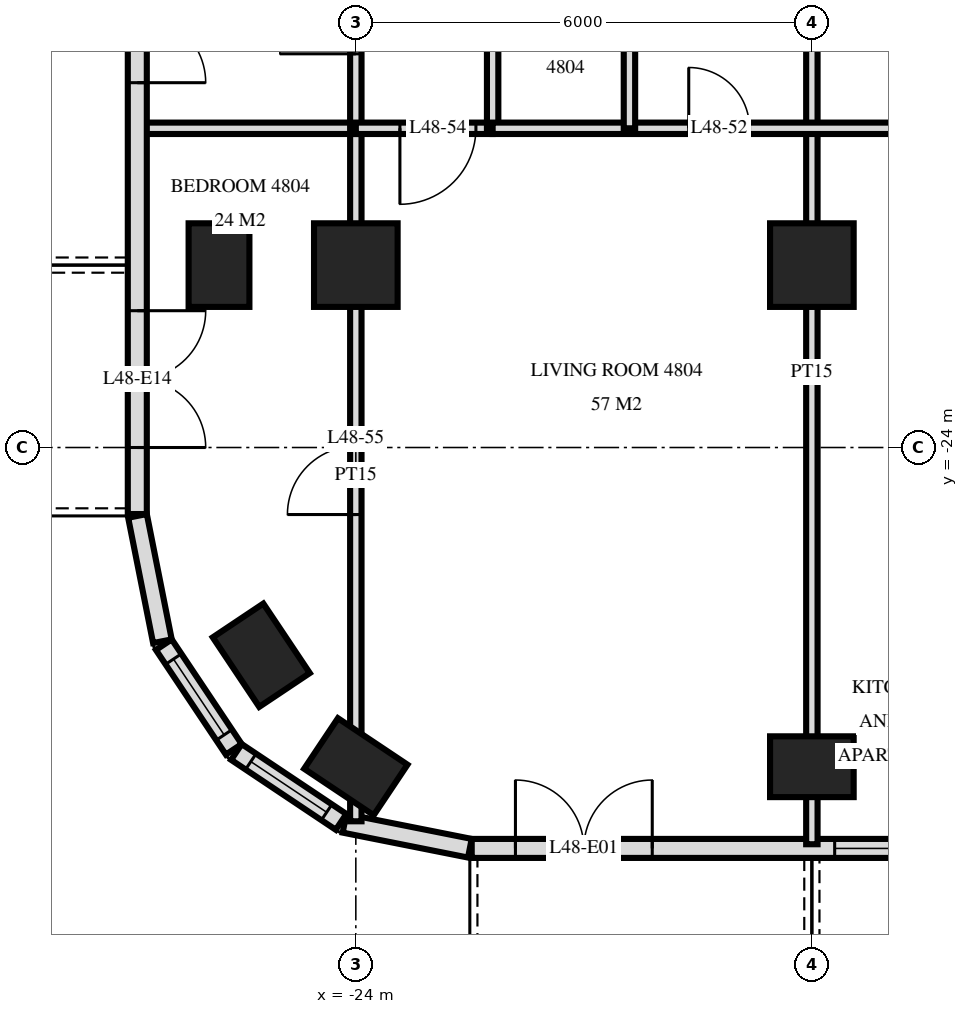
"""IFC4 building model, lengths in metres.
Left out: names, types, materials, properties, quantities, classifications, styles, units other than length and angle.
Written with IfcOpenShell. Run it as: python <this file> out.ifc"""

import sys

from ifc_helpers import new_model, si_unit, direction, frame, frame_2d, origin, origin_2d, place, context, subcontext, project, spatial, rectangle, extrude, element, fill, save


model = new_model("IFC4")
c1 = context("Model", 3, precision=1e-05, world=origin(), true_north=direction((0.0, 1.0)))
c2 = subcontext(c1, "Body", "Model", "MODEL_VIEW")
j1 = project(units=[si_unit("LENGTHUNIT", "METRE"), si_unit("PLANEANGLEUNIT", "RADIAN")], contexts=[c1])
p1 = place(None, origin())
s1 = spatial("IfcSite", under=j1, at=p1, CompositionType="ELEMENT")
p2 = place(p1, origin())
s2 = spatial("IfcBuilding", under=s1, at=p2, CompositionType="ELEMENT")
p3 = place(p2, frame((0.0, 0.0, 187.1)))
s3 = spatial("IfcBuildingStorey", under=s2, at=p3, CompositionType="ELEMENT", Elevation=187.1)
for number, where, z_axis, x_axis in (
    (1, (-25.8, -21.6, 0.0), (0.0, 0.0, 1.0), (0.0, 1.0, 0.0)),
    (2, (-25.244, -26.733, 0.0), (0.0, 0.0, 1.0), (-0.556, 0.831, 0.0)),
    (3, (-24.0, -28.2, 0.0), (0.0, 0.0, 1.0), (-0.831, 0.556, 0.0)),
):
    element("IfcColumn", number, at=place(p3, frame(where, z_axis=z_axis, x_axis=x_axis)), inside=s3, PredefinedType="COLUMN", context=c2, shape_type="SweptSolid", body=[
        extrude(rectangle(XDim=1.1, YDim=0.8, at=origin_2d()), origin(), (0.0, 0.0, 1.0), 3.5),
    ])
p4 = place(p3, frame((-24.0, -21.6, 0.0), z_axis=(0.0, 0.0, 1.0), x_axis=(1.0, 0.0, 0.0)))
e4 = element("IfcColumn", 4, at=p4, inside=s3, PredefinedType="COLUMN", context=c2, shape_type="SweptSolid", body=[
    extrude(rectangle(XDim=1.1, YDim=1.1, at=origin_2d()), origin(), (0.0, 0.0, 1.0), 3.5),
])
p5 = place(p3, frame((-18.0, -28.2, 0.0), z_axis=(0.0, 0.0, 1.0), x_axis=(1.0, 0.0, 0.0)))
e5 = element("IfcColumn", 5, at=p5, inside=s3, PredefinedType="COLUMN", context=c2, shape_type="SweptSolid", body=[
    extrude(rectangle(XDim=1.1, YDim=0.8, at=origin_2d()), origin(), (0.0, 0.0, 1.0), 3.5),
])
p6 = place(p3, frame((-18.0, -21.6, 0.0), z_axis=(0.0, 0.0, 1.0), x_axis=(1.0, 0.0, 0.0)))
e6 = element("IfcColumn", 6, at=p6, inside=s3, PredefinedType="COLUMN", context=c2, shape_type="SweptSolid", body=[
    extrude(rectangle(XDim=1.1, YDim=1.1, at=origin_2d()), origin(), (0.0, 0.0, 1.0), 3.5),
])
p7 = place(p3, frame((-26.875, -3.325, 0.0), z_axis=(0.0, 0.0, 1.0), x_axis=(0.0, -1.0, 0.0)))
e7 = element("IfcWall", 7, at=p7, inside=s3, PredefinedType="SOLIDWALL", context=c2, shape_type="SweptSolid", body=[
    extrude(rectangle(XDim=21.551, YDim=0.25, at=frame_2d((10.775, 0.0))), origin(), (0.0, 0.0, 1.0), 3.22),
])
p8 = place(p7, frame((7.025, 0.0, 0.0)))
e8 = element("IfcOpeningElement", 8, at=p8, cuts=e7, PredefinedType="OPENING", context=c2, shape_type="SweptSolid", body=[
    extrude(rectangle(XDim=1.8, YDim=2.4, at=frame_2d((0.9, 1.2))), frame((0.0, 0.135, 0.0), z_axis=(0.0, -1.0, 0.0), x_axis=(1.0, 0.0, 0.0)), (0.0, 0.0, 1.0), 0.27),
])
p9 = place(p7, frame((14.075, 0.0, 0.0)))
e9 = element("IfcOpeningElement", 9, at=p9, cuts=e7, PredefinedType="OPENING", context=c2, shape_type="SweptSolid", body=[
    extrude(rectangle(XDim=1.8, YDim=2.4, at=frame_2d((0.9, 1.2))), frame((0.0, 0.135, 0.0), z_axis=(0.0, -1.0, 0.0), x_axis=(1.0, 0.0, 0.0)), (0.0, 0.0, 1.0), 0.27),
])
p10 = place(p7, frame((18.875, 0.0, 0.0)))
e10 = element("IfcOpeningElement", 10, at=p10, cuts=e7, PredefinedType="OPENING", context=c2, shape_type="SweptSolid", body=[
    extrude(rectangle(XDim=1.8, YDim=2.4, at=frame_2d((0.9, 1.2))), frame((0.0, 0.135, 0.0), z_axis=(0.0, -1.0, 0.0), x_axis=(1.0, 0.0, 0.0)), (0.0, 0.0, 1.0), 0.27),
])
p11 = place(p3, frame((-26.873, -24.9, 0.0), z_axis=(0.0, 0.0, 1.0), x_axis=(0.195026884138, -0.980797896849, 0.0)))
e11 = element("IfcWall", 11, at=p11, inside=s3, PredefinedType="SOLIDWALL", context=c2, shape_type="SweptSolid", body=[
    extrude(rectangle(XDim=1.681, YDim=0.25, at=frame_2d((0.841, 0.0))), origin(), (0.0, 0.0, 1.0), 3.22),
])
p12 = place(p3, frame((-26.526, -26.594, 0.0), z_axis=(0.0, 0.0, 1.0), x_axis=(0.55555029066, -0.831482937015, 0.0)))
e12 = element("IfcWall", 12, at=p12, inside=s3, PredefinedType="SOLIDWALL", context=c2, shape_type="SweptSolid", body=[
    extrude(rectangle(XDim=1.656, YDim=0.25, at=frame_2d((0.828, 0.0))), origin(), (0.0, 0.0, 1.0), 3.22),
])
p13 = place(p12, frame((0.228, 0.0, 0.9)))
e13 = element("IfcOpeningElement", 13, at=p13, cuts=e12, PredefinedType="OPENING", context=c2, shape_type="SweptSolid", body=[
    extrude(rectangle(XDim=1.2, YDim=1.5, at=frame_2d((0.6, 0.75))), frame((0.0, 0.135, 0.0), z_axis=(0.0, -1.0, 0.0), x_axis=(1.0, 0.0, 0.0)), (0.0, 0.0, 1.0), 0.27),
])
p14 = place(p3, frame((-25.571, -28.006, 0.0), z_axis=(0.0, 0.0, 1.0), x_axis=(0.831482937015, -0.55555029066, 0.0)))
e14 = element("IfcWall", 14, at=p14, inside=s3, PredefinedType="SOLIDWALL", context=c2, shape_type="SweptSolid", body=[
    extrude(rectangle(XDim=1.656, YDim=0.25, at=frame_2d((0.828, 0.0))), origin(), (0.0, 0.0, 1.0), 3.22),
])
p15 = place(p14, frame((0.228, 0.0, 0.9)))
e15 = element("IfcOpeningElement", 15, at=p15, cuts=e14, PredefinedType="OPENING", context=c2, shape_type="SweptSolid", body=[
    extrude(rectangle(XDim=1.2, YDim=1.5, at=frame_2d((0.6, 0.75))), frame((0.0, 0.135, 0.0), z_axis=(0.0, -1.0, 0.0), x_axis=(1.0, 0.0, 0.0)), (0.0, 0.0, 1.0), 0.27),
])
p16 = place(p3, frame((-24.149, -28.945, 0.0), z_axis=(0.0, 0.0, 1.0), x_axis=(0.980775640221, -0.19513878023, 0.0)))
e16 = element("IfcWall", 16, at=p16, inside=s3, PredefinedType="SOLIDWALL", context=c2, shape_type="SweptSolid", body=[
    extrude(rectangle(XDim=1.681, YDim=0.25, at=frame_2d((0.841, 0.0))), origin(), (0.0, 0.0, 1.0), 3.22),
])
p17 = place(p3, frame((-22.475, -29.275, 0.0), z_axis=(0.0, 0.0, 1.0), x_axis=(1.0, 0.0, 0.0)))
e17 = element("IfcWall", 17, at=p17, inside=s3, PredefinedType="SOLIDWALL", context=c2, shape_type="SweptSolid", body=[
    extrude(rectangle(XDim=44.951, YDim=0.25, at=frame_2d((22.475, 0.0))), origin(), (0.0, 0.0, 1.0), 3.22),
])
p18 = place(p17, frame((0.575, 0.0, 0.0)))
e18 = element("IfcOpeningElement", 18, at=p18, cuts=e17, PredefinedType="OPENING", context=c2, shape_type="SweptSolid", body=[
    extrude(rectangle(XDim=1.8, YDim=2.4, at=frame_2d((0.9, 1.2))), frame((0.0, 0.135, 0.0), z_axis=(0.0, -1.0, 0.0), x_axis=(1.0, 0.0, 0.0)), (0.0, 0.0, 1.0), 0.27),
])
p19 = place(p17, frame((4.775, 0.0, 0.9)))
e19 = element("IfcOpeningElement", 19, at=p19, cuts=e17, PredefinedType="OPENING", context=c2, shape_type="SweptSolid", body=[
    extrude(rectangle(XDim=2.4, YDim=1.5, at=frame_2d((1.2, 0.75))), frame((0.0, 0.135, 0.0), z_axis=(0.0, -1.0, 0.0), x_axis=(1.0, 0.0, 0.0)), (0.0, 0.0, 1.0), 0.27),
])
p20 = place(p17, frame((8.075, 0.0, 0.0)))
e20 = element("IfcOpeningElement", 20, at=p20, cuts=e17, PredefinedType="OPENING", context=c2, shape_type="SweptSolid", body=[
    extrude(rectangle(XDim=1.8, YDim=2.4, at=frame_2d((0.9, 1.2))), frame((0.0, 0.135, 0.0), z_axis=(0.0, -1.0, 0.0), x_axis=(1.0, 0.0, 0.0)), (0.0, 0.0, 1.0), 0.27),
])
p21 = place(p17, frame((11.075, 0.0, 0.0)))
e21 = element("IfcOpeningElement", 21, at=p21, cuts=e17, PredefinedType="OPENING", context=c2, shape_type="SweptSolid", body=[
    extrude(rectangle(XDim=1.8, YDim=2.4, at=frame_2d((0.9, 1.2))), frame((0.0, 0.135, 0.0), z_axis=(0.0, -1.0, 0.0), x_axis=(1.0, 0.0, 0.0)), (0.0, 0.0, 1.0), 0.27),
])
p22 = place(p17, frame((13.775, 0.0, 0.9)))
e22 = element("IfcOpeningElement", 22, at=p22, cuts=e17, PredefinedType="OPENING", context=c2, shape_type="SweptSolid", body=[
    extrude(rectangle(XDim=2.4, YDim=1.5, at=frame_2d((1.2, 0.75))), frame((0.0, 0.135, 0.0), z_axis=(0.0, -1.0, 0.0), x_axis=(1.0, 0.0, 0.0)), (0.0, 0.0, 1.0), 0.27),
])
p23 = place(p17, frame((20.075, 0.0, 0.0)))
e23 = element("IfcOpeningElement", 23, at=p23, cuts=e17, PredefinedType="OPENING", context=c2, shape_type="SweptSolid", body=[
    extrude(rectangle(XDim=1.8, YDim=2.4, at=frame_2d((0.9, 1.2))), frame((0.0, 0.135, 0.0), z_axis=(0.0, -1.0, 0.0), x_axis=(1.0, 0.0, 0.0)), (0.0, 0.0, 1.0), 0.27),
])
p24 = place(p17, frame((23.075, 0.0, 0.0)))
e24 = element("IfcOpeningElement", 24, at=p24, cuts=e17, PredefinedType="OPENING", context=c2, shape_type="SweptSolid", body=[
    extrude(rectangle(XDim=1.8, YDim=2.4, at=frame_2d((0.9, 1.2))), frame((0.0, 0.135, 0.0), z_axis=(0.0, -1.0, 0.0), x_axis=(1.0, 0.0, 0.0)), (0.0, 0.0, 1.0), 0.27),
])
p25 = place(p17, frame((29.075, 0.0, 0.0)))
e25 = element("IfcOpeningElement", 25, at=p25, cuts=e17, PredefinedType="OPENING", context=c2, shape_type="SweptSolid", body=[
    extrude(rectangle(XDim=1.8, YDim=2.4, at=frame_2d((0.9, 1.2))), frame((0.0, 0.135, 0.0), z_axis=(0.0, -1.0, 0.0), x_axis=(1.0, 0.0, 0.0)), (0.0, 0.0, 1.0), 0.27),
])
p26 = place(p17, frame((31.775, 0.0, 0.9)))
e26 = element("IfcOpeningElement", 26, at=p26, cuts=e17, PredefinedType="OPENING", context=c2, shape_type="SweptSolid", body=[
    extrude(rectangle(XDim=2.4, YDim=1.5, at=frame_2d((1.2, 0.75))), frame((0.0, 0.135, 0.0), z_axis=(0.0, -1.0, 0.0), x_axis=(1.0, 0.0, 0.0)), (0.0, 0.0, 1.0), 0.27),
])
p27 = place(p17, frame((35.075, 0.0, 0.0)))
e27 = element("IfcOpeningElement", 27, at=p27, cuts=e17, PredefinedType="OPENING", context=c2, shape_type="SweptSolid", body=[
    extrude(rectangle(XDim=1.8, YDim=2.4, at=frame_2d((0.9, 1.2))), frame((0.0, 0.135, 0.0), z_axis=(0.0, -1.0, 0.0), x_axis=(1.0, 0.0, 0.0)), (0.0, 0.0, 1.0), 0.27),
])
p28 = place(p17, frame((37.775, 0.0, 0.9)))
e28 = element("IfcOpeningElement", 28, at=p28, cuts=e17, PredefinedType="OPENING", context=c2, shape_type="SweptSolid", body=[
    extrude(rectangle(XDim=2.4, YDim=1.5, at=frame_2d((1.2, 0.75))), frame((0.0, 0.135, 0.0), z_axis=(0.0, -1.0, 0.0), x_axis=(1.0, 0.0, 0.0)), (0.0, 0.0, 1.0), 0.27),
])
p29 = place(p17, frame((41.075, 0.0, 0.0)))
e29 = element("IfcOpeningElement", 29, at=p29, cuts=e17, PredefinedType="OPENING", context=c2, shape_type="SweptSolid", body=[
    extrude(rectangle(XDim=1.8, YDim=2.4, at=frame_2d((0.9, 1.2))), frame((0.0, 0.135, 0.0), z_axis=(0.0, -1.0, 0.0), x_axis=(1.0, 0.0, 0.0)), (0.0, 0.0, 1.0), 0.27),
])
p30 = place(p3, frame((-18.0, -29.22, 0.0), z_axis=(0.0, 0.0, 1.0), x_axis=(0.0, 1.0, 0.0)))
e30 = element("IfcWall", 30, at=p30, inside=s3, PredefinedType="PARTITIONING", context=c2, shape_type="SweptSolid", body=[
    extrude(rectangle(XDim=12.42, YDim=0.15, at=frame_2d((6.21, 0.0))), origin(), (0.0, 0.0, 1.0), 3.22),
])
for number, where, z_axis, x_axis in (
    (31, (-20.4, -19.8, 0.0), (0.0, 0.0, 1.0), (0.0, 1.0, 0.0)),
    (32, (-22.2, -19.8, 0.0), (0.0, 0.0, 1.0), (0.0, 1.0, 0.0)),
):
    element("IfcWall", number, at=place(p3, frame(where, z_axis=z_axis, x_axis=x_axis)), inside=s3, PredefinedType="PARTITIONING", context=c2, shape_type="SweptSolid", body=[
        extrude(rectangle(XDim=3.0, YDim=0.15, at=frame_2d((1.5, 0.0))), origin(), (0.0, 0.0, 1.0), 3.22),
    ])
p31 = place(p3, frame((-24.0, -19.8, 0.0), z_axis=(0.0, 0.0, 1.0), x_axis=(0.0, 1.0, 0.0)))
e33 = element("IfcWall", 33, at=p31, inside=s3, PredefinedType="PARTITIONING", context=c2, shape_type="SweptSolid", body=[
    extrude(rectangle(XDim=3.0, YDim=0.15, at=frame_2d((1.5, 0.0))), origin(), (0.0, 0.0, 1.0), 3.22),
])
p32 = place(p31, frame((0.98, 0.0, 0.0)))
e34 = element("IfcOpeningElement", 34, at=p32, cuts=e33, PredefinedType="OPENING", context=c2, shape_type="SweptSolid", body=[
    extrude(rectangle(XDim=1.0, YDim=2.1, at=frame_2d((0.5, 1.05))), frame((0.0, 0.085, 0.0), z_axis=(0.0, -1.0, 0.0), x_axis=(1.0, 0.0, 0.0)), (0.0, 0.0, 1.0), 0.17),
])
p33 = place(p3, frame((-24.0, -28.918, 0.0), z_axis=(0.0, 0.0, 1.0), x_axis=(0.0, 1.0, 0.0)))
e35 = element("IfcWall", 35, at=p33, inside=s3, PredefinedType="PARTITIONING", context=c2, shape_type="SweptSolid", body=[
    extrude(rectangle(XDim=9.118, YDim=0.15, at=frame_2d((4.559, 0.0))), origin(), (0.0, 0.0, 1.0), 3.22),
])
p34 = place(p33, frame((4.036, 0.0, 0.0)))
e36 = element("IfcOpeningElement", 36, at=p34, cuts=e35, PredefinedType="OPENING", context=c2, shape_type="SweptSolid", body=[
    extrude(rectangle(XDim=0.9, YDim=2.1, at=frame_2d((0.45, 1.05))), frame((0.0, 0.085, 0.0), z_axis=(0.0, -1.0, 0.0), x_axis=(1.0, 0.0, 0.0)), (0.0, 0.0, 1.0), 0.17),
])
p35 = place(p3, frame((-24.0, -19.8, 0.0), z_axis=(0.0, 0.0, 1.0), x_axis=(1.0, 0.0, 0.0)))
e37 = element("IfcWall", 37, at=p35, inside=s3, PredefinedType="PARTITIONING", context=c2, shape_type="SweptSolid", body=[
    extrude(rectangle(XDim=1.8, YDim=0.15, at=frame_2d((0.9, 0.0))), origin(), (0.0, 0.0, 1.0), 3.22),
])
p36 = place(p35, frame((0.58, 0.0, 0.0)))
e38 = element("IfcOpeningElement", 38, at=p36, cuts=e37, PredefinedType="OPENING", context=c2, shape_type="SweptSolid", body=[
    extrude(rectangle(XDim=1.0, YDim=2.1, at=frame_2d((0.5, 1.05))), frame((0.0, 0.085, 0.0), z_axis=(0.0, -1.0, 0.0), x_axis=(1.0, 0.0, 0.0)), (0.0, 0.0, 1.0), 0.17),
])
p37 = place(p3, frame((-26.82, -19.8, 0.0), z_axis=(0.0, 0.0, 1.0), x_axis=(1.0, 0.0, 0.0)))
e39 = element("IfcWall", 39, at=p37, inside=s3, PredefinedType="PARTITIONING", context=c2, shape_type="SweptSolid", body=[
    extrude(rectangle(XDim=2.82, YDim=0.15, at=frame_2d((1.41, 0.0))), origin(), (0.0, 0.0, 1.0), 3.22),
])
p38 = place(p3, frame((-22.2, -19.8, 0.0), z_axis=(0.0, 0.0, 1.0), x_axis=(1.0, 0.0, 0.0)))
e40 = element("IfcWall", 40, at=p38, inside=s3, PredefinedType="PARTITIONING", context=c2, shape_type="SweptSolid", body=[
    extrude(rectangle(XDim=5.9, YDim=0.15, at=frame_2d((2.95, 0.0))), origin(), (0.0, 0.0, 1.0), 3.22),
])
p39 = place(p38, frame((2.58, 0.0, 0.0)))
e41 = element("IfcOpeningElement", 41, at=p39, cuts=e40, PredefinedType="OPENING", context=c2, shape_type="SweptSolid", body=[
    extrude(rectangle(XDim=0.8, YDim=2.1, at=frame_2d((0.4, 1.05))), frame((0.0, 0.085, 0.0), z_axis=(0.0, -1.0, 0.0), x_axis=(1.0, 0.0, 0.0)), (0.0, 0.0, 1.0), 0.17),
])
p40 = place(p13, origin())
e42 = element("IfcWindow", 42, at=p40, inside=s3, PartitioningType="SINGLE_PANEL", PredefinedType="WINDOW", context=c2, shape_type="SweptSolid", body=[
    extrude(rectangle(XDim=1.2, YDim=1.5, at=frame_2d((0.6, 0.75))), frame((0.0, 0.03, 0.0), z_axis=(0.0, -1.0, 0.0), x_axis=(1.0, 0.0, 0.0)), (0.0, 0.0, 1.0), 0.06),
])
fill(e13, e42)
p41 = place(p15, origin())
e43 = element("IfcWindow", 43, at=p41, inside=s3, PartitioningType="SINGLE_PANEL", PredefinedType="WINDOW", context=c2, shape_type="SweptSolid", body=[
    extrude(rectangle(XDim=1.2, YDim=1.5, at=frame_2d((0.6, 0.75))), frame((0.0, 0.03, 0.0), z_axis=(0.0, -1.0, 0.0), x_axis=(1.0, 0.0, 0.0)), (0.0, 0.0, 1.0), 0.06),
])
fill(e15, e43)
p42 = place(p18, origin())
e44 = element("IfcDoor", 44, at=p42, inside=s3, OperationType="DOUBLE_DOOR_SINGLE_SWING", PredefinedType="DOOR", context=c2, shape_type="SweptSolid", body=[
    extrude(rectangle(XDim=1.8, YDim=2.4, at=frame_2d((0.9, 1.2))), frame((0.0, 0.025, 0.0), z_axis=(0.0, -1.0, 0.0), x_axis=(1.0, 0.0, 0.0)), (0.0, 0.0, 1.0), 0.05),
])
fill(e18, e44)
p43 = place(p19, origin())
e45 = element("IfcWindow", 45, at=p43, inside=s3, PartitioningType="SINGLE_PANEL", PredefinedType="WINDOW", context=c2, shape_type="SweptSolid", body=[
    extrude(rectangle(XDim=2.4, YDim=1.5, at=frame_2d((1.2, 0.75))), frame((0.0, 0.03, 0.0), z_axis=(0.0, -1.0, 0.0), x_axis=(1.0, 0.0, 0.0)), (0.0, 0.0, 1.0), 0.06),
])
fill(e19, e45)
p44 = place(p9, origin())
e46 = element("IfcDoor", 46, at=p44, inside=s3, OperationType="DOUBLE_DOOR_SINGLE_SWING", PredefinedType="DOOR", context=c2, shape_type="SweptSolid", body=[
    extrude(rectangle(XDim=1.8, YDim=2.4, at=frame_2d((0.9, 1.2))), frame((0.0, 0.025, 0.0), z_axis=(0.0, -1.0, 0.0), x_axis=(1.0, 0.0, 0.0)), (0.0, 0.0, 1.0), 0.05),
])
fill(e9, e46)
p45 = place(p10, origin())
e47 = element("IfcDoor", 47, at=p45, inside=s3, OperationType="DOUBLE_DOOR_SINGLE_SWING", PredefinedType="DOOR", context=c2, shape_type="SweptSolid", body=[
    extrude(rectangle(XDim=1.8, YDim=2.4, at=frame_2d((0.9, 1.2))), frame((0.0, 0.025, 0.0), z_axis=(0.0, -1.0, 0.0), x_axis=(1.0, 0.0, 0.0)), (0.0, 0.0, 1.0), 0.05),
])
fill(e10, e47)
p46 = place(p39, origin())
e48 = element("IfcDoor", 48, at=p46, inside=s3, OperationType="SINGLE_SWING_RIGHT", PredefinedType="DOOR", context=c2, shape_type="SweptSolid", body=[
    extrude(rectangle(XDim=0.8, YDim=2.1, at=frame_2d((0.4, 1.05))), frame((0.0, 0.025, 0.0), z_axis=(0.0, -1.0, 0.0), x_axis=(1.0, 0.0, 0.0)), (0.0, 0.0, 1.0), 0.05),
])
fill(e41, e48)
p47 = place(p32, origin())
e49 = element("IfcDoor", 49, at=p47, inside=s3, OperationType="SINGLE_SWING_RIGHT", PredefinedType="DOOR", context=c2, shape_type="SweptSolid", body=[
    extrude(rectangle(XDim=1.0, YDim=2.1, at=frame_2d((0.5, 1.05))), frame((0.0, 0.025, 0.0), z_axis=(0.0, -1.0, 0.0), x_axis=(1.0, 0.0, 0.0)), (0.0, 0.0, 1.0), 0.05),
])
fill(e34, e49)
p48 = place(p36, frame((0.5, 0.0, 0.0), z_axis=(0.0, 0.0, 1.0), x_axis=(-1.0, 0.0, 0.0)))
e50 = element("IfcDoor", 50, at=p48, inside=s3, OperationType="SINGLE_SWING_LEFT", PredefinedType="DOOR", context=c2, shape_type="SweptSolid", body=[
    extrude(rectangle(XDim=1.0, YDim=2.1, at=frame_2d((0.0, 1.05))), frame((0.0, -0.025, 0.0), z_axis=(0.0, 1.0, 0.0), x_axis=(-1.0, 0.0, 0.0)), (0.0, 0.0, 1.0), 0.05),
])
fill(e38, e50)
p49 = place(p34, origin())
e51 = element("IfcDoor", 51, at=p49, inside=s3, OperationType="SINGLE_SWING_RIGHT", PredefinedType="DOOR", context=c2, shape_type="SweptSolid", body=[
    extrude(rectangle(XDim=0.9, YDim=2.1, at=frame_2d((0.45, 1.05))), frame((0.0, 0.025, 0.0), z_axis=(0.0, -1.0, 0.0), x_axis=(1.0, 0.0, 0.0)), (0.0, 0.0, 1.0), 0.05),
])
fill(e36, e51)
save(model, sys.argv[1])
